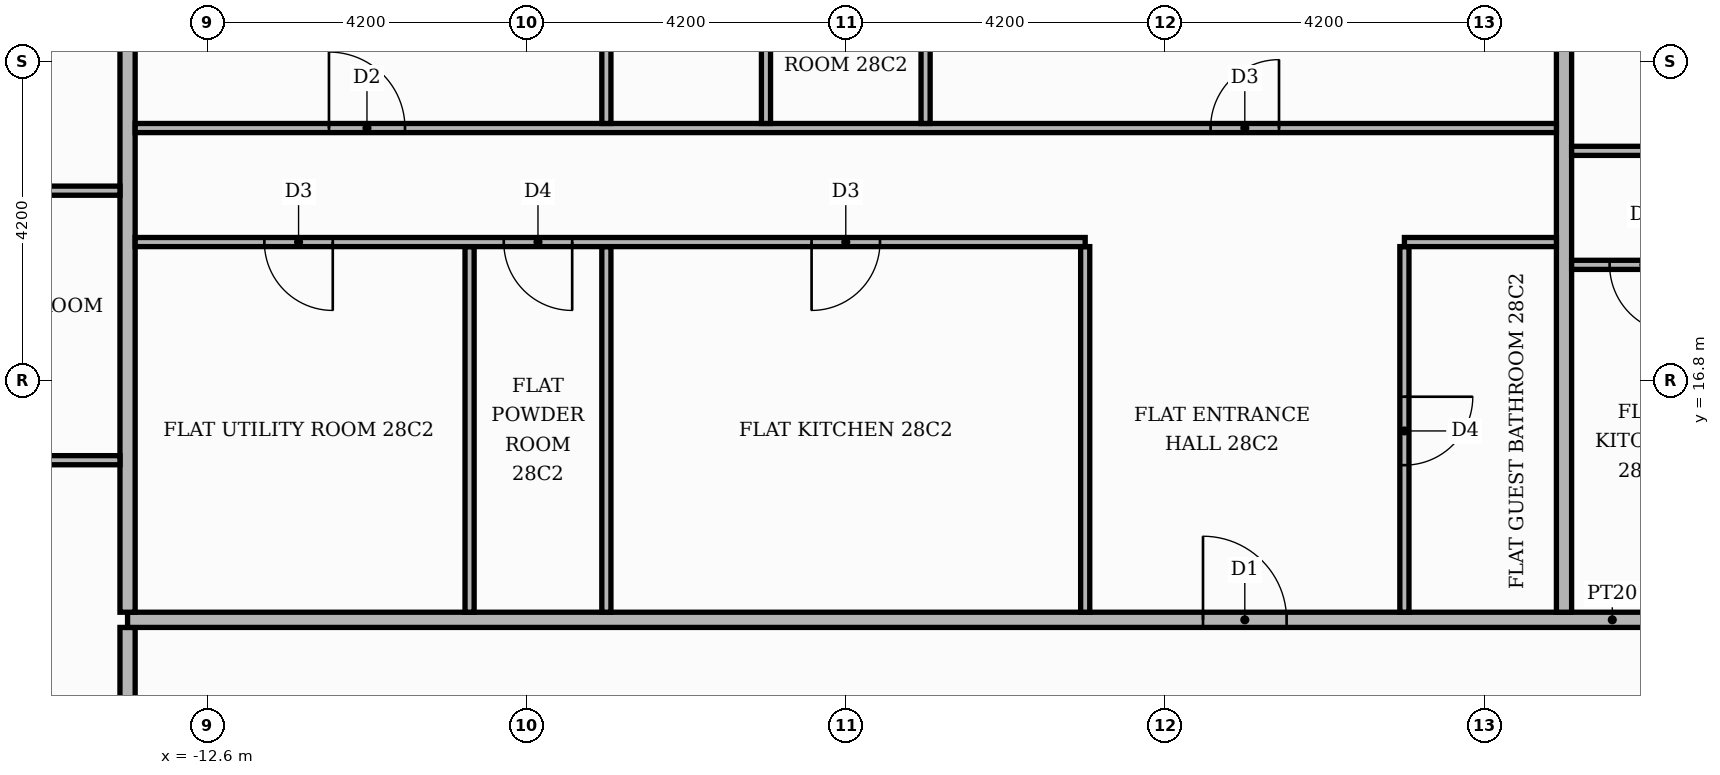
"""IFC4 building model, lengths in metres.
Left out: names, types, materials, properties, quantities, classifications, styles, units other than length and angle.
Written with IfcOpenShell. Run it as: python <this file> out.ifc"""

import sys

from ifc_helpers import new_model, si_unit, direction, frame, frame_2d, origin, place, context, subcontext, project, spatial, rectangle, extrude, element, fill, save


model = new_model("IFC4")
c1 = context("Model", 3, precision=1e-05, world=origin(), true_north=direction((0.0, 1.0)))
c2 = subcontext(c1, "Body", "Model", "MODEL_VIEW")
j1 = project(units=[si_unit("LENGTHUNIT", "METRE"), si_unit("PLANEANGLEUNIT", "RADIAN")], contexts=[c1])
p1 = place(None, origin())
s1 = spatial("IfcSite", under=j1, at=p1, CompositionType="ELEMENT")
p2 = place(p1, origin())
s2 = spatial("IfcBuilding", under=s1, at=p2, CompositionType="ELEMENT")
p3 = place(p2, frame((0.0, 0.0, 118.2)))
s3 = spatial("IfcBuildingStorey", under=s2, at=p3, CompositionType="ELEMENT", Elevation=118.2)
p4 = place(p3, frame((-13.65, 5.35, 0.0), z_axis=(0.0, 0.0, 1.0), x_axis=(0.0, 1.0, 0.0)))
e1 = element("IfcWall", 1, at=p4, inside=s3, PredefinedType="PARTITIONING", context=c2, shape_type="SweptSolid", body=[
    extrude(rectangle(XDim=8.2, YDim=0.2, at=frame_2d((4.1, 0.0))), origin(), (0.0, 0.0, 1.0), 3.48),
])
p5 = place(p4, frame((5.65, 0.0, 0.0)))
e2 = element("IfcOpeningElement", 2, at=p5, cuts=e1, PredefinedType="OPENING", context=c2, shape_type="SweptSolid", body=[
    extrude(rectangle(XDim=1.1, YDim=2.4, at=frame_2d((0.55, 1.2))), frame((0.0, 0.11, 0.0), z_axis=(0.0, -1.0, 0.0), x_axis=(1.0, 0.0, 0.0)), (0.0, 0.0, 1.0), 0.22),
])
p6 = place(p3, frame((-13.65, 13.65, 0.0), z_axis=(0.0, 0.0, 1.0), x_axis=(1.0, 0.0, 0.0)))
e3 = element("IfcWall", 3, at=p6, inside=s3, PredefinedType="PARTITIONING", context=c2, shape_type="SweptSolid", body=[
    extrude(rectangle(XDim=39.07, YDim=0.2, at=frame_2d((19.535, 0.0))), origin(), (0.0, 0.0, 1.0), 3.48),
])
p7 = place(p6, frame((24.65, 0.0, 0.0)))
e4 = element("IfcOpeningElement", 4, at=p7, cuts=e3, PredefinedType="OPENING", context=c2, shape_type="SweptSolid", body=[
    extrude(rectangle(XDim=1.1, YDim=2.4, at=frame_2d((0.55, 1.2))), frame((0.0, 0.11, 0.0), z_axis=(0.0, -1.0, 0.0), x_axis=(1.0, 0.0, 0.0)), (0.0, 0.0, 1.0), 0.22),
])
p8 = place(p6, frame((14.15, 0.0, 0.0)))
e5 = element("IfcOpeningElement", 5, at=p8, cuts=e3, PredefinedType="OPENING", context=c2, shape_type="SweptSolid", body=[
    extrude(rectangle(XDim=1.1, YDim=2.4, at=frame_2d((0.55, 1.2))), frame((0.0, 0.11, 0.0), z_axis=(0.0, -1.0, 0.0), x_axis=(1.0, 0.0, 0.0)), (0.0, 0.0, 1.0), 0.22),
])
p9 = place(p3, frame((-13.65, 13.75, 0.0), z_axis=(0.0, 0.0, 1.0), x_axis=(0.0, 1.0, 0.0)))
e6 = element("IfcWall", 6, at=p9, inside=s3, PredefinedType="PARTITIONING", context=c2, shape_type="SweptSolid", body=[
    extrude(rectangle(XDim=11.67, YDim=0.2, at=frame_2d((5.835, 0.0))), origin(), (0.0, 0.0, 1.0), 3.48),
])
for number, where, z_axis, x_axis in (
    (7, (-9.15, 13.75, 0.0), (0.0, 0.0, 1.0), (0.0, 1.0, 0.0)),
    (8, (-7.35, 13.75, 0.0), (0.0, 0.0, 1.0), (0.0, 1.0, 0.0)),
    (9, (-1.05, 13.75, 0.0), (0.0, 0.0, 1.0), (0.0, 1.0, 0.0)),
):
    element("IfcWall", number, at=place(p3, frame(where, z_axis=z_axis, x_axis=x_axis)), inside=s3, PredefinedType="PARTITIONING", context=c2, shape_type="SweptSolid", body=[
        extrude(rectangle(XDim=4.81, YDim=0.12, at=frame_2d((2.405, 0.0))), origin(), (0.0, 0.0, 1.0), 3.48),
    ])
p10 = place(p3, frame((3.15, 13.75, 0.0), z_axis=(0.0, 0.0, 1.0), x_axis=(0.0, 1.0, 0.0)))
e10 = element("IfcWall", 10, at=p10, inside=s3, PredefinedType="PARTITIONING", context=c2, shape_type="SweptSolid", body=[
    extrude(rectangle(XDim=4.81, YDim=0.12, at=frame_2d((2.405, 0.0))), origin(), (0.0, 0.0, 1.0), 3.48),
])
p11 = place(p10, frame((1.935, 0.0, 0.0)))
e11 = element("IfcOpeningElement", 11, at=p11, cuts=e10, PredefinedType="OPENING", context=c2, shape_type="SweptSolid", body=[
    extrude(rectangle(XDim=0.9, YDim=2.1, at=frame_2d((0.45, 1.05))), frame((0.0, 0.07, 0.0), z_axis=(0.0, -1.0, 0.0), x_axis=(1.0, 0.0, 0.0)), (0.0, 0.0, 1.0), 0.14),
])
p12 = place(p3, frame((5.25, 13.75, 0.0), z_axis=(0.0, 0.0, 1.0), x_axis=(0.0, 1.0, 0.0)))
e12 = element("IfcWall", 12, at=p12, inside=s3, PredefinedType="PARTITIONING", context=c2, shape_type="SweptSolid", body=[
    extrude(rectangle(XDim=11.67, YDim=0.2, at=frame_2d((5.835, 0.0))), origin(), (0.0, 0.0, 1.0), 3.48),
])
p13 = place(p3, frame((-19.82, 15.75, 0.0), z_axis=(0.0, 0.0, 1.0), x_axis=(1.0, 0.0, 0.0)))
e13 = element("IfcWall", 13, at=p13, inside=s3, PredefinedType="PARTITIONING", context=c2, shape_type="SweptSolid", body=[
    extrude(rectangle(XDim=6.07, YDim=0.12, at=frame_2d((3.035, 0.0))), origin(), (0.0, 0.0, 1.0), 3.48),
])
p14 = place(p13, frame((2.585, 0.0, 0.0)))
e14 = element("IfcOpeningElement", 14, at=p14, cuts=e13, PredefinedType="OPENING", context=c2, shape_type="SweptSolid", body=[
    extrude(rectangle(XDim=1.0, YDim=2.1, at=frame_2d((0.5, 1.05))), frame((0.0, 0.07, 0.0), z_axis=(0.0, -1.0, 0.0), x_axis=(1.0, 0.0, 0.0)), (0.0, 0.0, 1.0), 0.14),
])
p15 = place(p3, frame((5.35, 18.32, 0.0), z_axis=(0.0, 0.0, 1.0), x_axis=(1.0, 0.0, 0.0)))
e15 = element("IfcWall", 15, at=p15, inside=s3, PredefinedType="PARTITIONING", context=c2, shape_type="SweptSolid", body=[
    extrude(rectangle(XDim=4.1, YDim=0.12, at=frame_2d((2.05, 0.0))), origin(), (0.0, 0.0, 1.0), 3.48),
])
p16 = place(p15, frame((0.5, 0.0, 0.0)))
e16 = element("IfcOpeningElement", 16, at=p16, cuts=e15, PredefinedType="OPENING", context=c2, shape_type="SweptSolid", body=[
    extrude(rectangle(XDim=0.9, YDim=2.1, at=frame_2d((0.45, 1.05))), frame((0.0, 0.07, 0.0), z_axis=(0.0, -1.0, 0.0), x_axis=(1.0, 0.0, 0.0)), (0.0, 0.0, 1.0), 0.14),
])
p17 = place(p3, frame((-13.55, 18.62, 0.0), z_axis=(0.0, 0.0, 1.0), x_axis=(1.0, 0.0, 0.0)))
e17 = element("IfcWall", 17, at=p17, inside=s3, PredefinedType="PARTITIONING", context=c2, shape_type="SweptSolid", body=[
    extrude(rectangle(XDim=12.5, YDim=0.12, at=frame_2d((6.25, 0.0))), origin(), (0.0, 0.0, 1.0), 3.48),
])
p18 = place(p17, frame((8.9, 0.0, 0.0)))
e18 = element("IfcOpeningElement", 18, at=p18, cuts=e17, PredefinedType="OPENING", context=c2, shape_type="SweptSolid", body=[
    extrude(rectangle(XDim=0.9, YDim=2.1, at=frame_2d((0.45, 1.05))), frame((0.0, 0.07, 0.0), z_axis=(0.0, -1.0, 0.0), x_axis=(1.0, 0.0, 0.0)), (0.0, 0.0, 1.0), 0.14),
])
p19 = place(p17, frame((4.85, 0.0, 0.0)))
e19 = element("IfcOpeningElement", 19, at=p19, cuts=e17, PredefinedType="OPENING", context=c2, shape_type="SweptSolid", body=[
    extrude(rectangle(XDim=0.9, YDim=2.1, at=frame_2d((0.45, 1.05))), frame((0.0, 0.07, 0.0), z_axis=(0.0, -1.0, 0.0), x_axis=(1.0, 0.0, 0.0)), (0.0, 0.0, 1.0), 0.14),
])
p20 = place(p17, frame((1.7, 0.0, 0.0)))
e20 = element("IfcOpeningElement", 20, at=p20, cuts=e17, PredefinedType="OPENING", context=c2, shape_type="SweptSolid", body=[
    extrude(rectangle(XDim=0.9, YDim=2.1, at=frame_2d((0.45, 1.05))), frame((0.0, 0.07, 0.0), z_axis=(0.0, -1.0, 0.0), x_axis=(1.0, 0.0, 0.0)), (0.0, 0.0, 1.0), 0.14),
])
p21 = place(p3, frame((3.15, 18.62, 0.0), z_axis=(0.0, 0.0, 1.0), x_axis=(1.0, 0.0, 0.0)))
e21 = element("IfcWall", 21, at=p21, inside=s3, PredefinedType="PARTITIONING", context=c2, shape_type="SweptSolid", body=[
    extrude(rectangle(XDim=2.0, YDim=0.12, at=frame_2d((1.0, 0.0))), origin(), (0.0, 0.0, 1.0), 3.48),
])
p22 = place(p3, frame((-17.4, 19.296, 0.0), z_axis=(0.0, 0.0, 1.0), x_axis=(1.0, 0.0, 0.0)))
e22 = element("IfcWall", 22, at=p22, inside=s3, PredefinedType="PARTITIONING", context=c2, shape_type="SweptSolid", body=[
    extrude(rectangle(XDim=3.65, YDim=0.12, at=frame_2d((1.825, 0.0))), origin(), (0.0, 0.0, 1.0), 3.48),
])
p23 = place(p3, frame((5.35, 19.82, 0.0), z_axis=(0.0, 0.0, 1.0), x_axis=(1.0, 0.0, 0.0)))
e23 = element("IfcWall", 23, at=p23, inside=s3, PredefinedType="PARTITIONING", context=c2, shape_type="SweptSolid", body=[
    extrude(rectangle(XDim=12.05, YDim=0.12, at=frame_2d((6.025, 0.0))), origin(), (0.0, 0.0, 1.0), 3.48),
])
p24 = place(p23, frame((8.85, 0.0, 0.0)))
e24 = element("IfcOpeningElement", 24, at=p24, cuts=e23, PredefinedType="OPENING", context=c2, shape_type="SweptSolid", body=[
    extrude(rectangle(XDim=1.0, YDim=2.1, at=frame_2d((0.5, 1.05))), frame((0.0, 0.07, 0.0), z_axis=(0.0, -1.0, 0.0), x_axis=(1.0, 0.0, 0.0)), (0.0, 0.0, 1.0), 0.14),
])
p25 = place(p23, frame((5.75, 0.0, 0.0)))
e25 = element("IfcOpeningElement", 25, at=p25, cuts=e23, PredefinedType="OPENING", context=c2, shape_type="SweptSolid", body=[
    extrude(rectangle(XDim=0.9, YDim=2.1, at=frame_2d((0.45, 1.05))), frame((0.0, 0.07, 0.0), z_axis=(0.0, -1.0, 0.0), x_axis=(1.0, 0.0, 0.0)), (0.0, 0.0, 1.0), 0.14),
])
p26 = place(p3, frame((-13.55, 20.12, 0.0), z_axis=(0.0, 0.0, 1.0), x_axis=(1.0, 0.0, 0.0)))
e26 = element("IfcWall", 26, at=p26, inside=s3, PredefinedType="PARTITIONING", context=c2, shape_type="SweptSolid", body=[
    extrude(rectangle(XDim=18.7, YDim=0.12, at=frame_2d((9.35, 0.0))), origin(), (0.0, 0.0, 1.0), 3.48),
])
p27 = place(p26, frame((14.15, 0.0, 0.0)))
e27 = element("IfcOpeningElement", 27, at=p27, cuts=e26, PredefinedType="OPENING", context=c2, shape_type="SweptSolid", body=[
    extrude(rectangle(XDim=0.9, YDim=2.1, at=frame_2d((0.45, 1.05))), frame((0.0, 0.07, 0.0), z_axis=(0.0, -1.0, 0.0), x_axis=(1.0, 0.0, 0.0)), (0.0, 0.0, 1.0), 0.14),
])
p28 = place(p26, frame((2.55, 0.0, 0.0)))
e28 = element("IfcOpeningElement", 28, at=p28, cuts=e26, PredefinedType="OPENING", context=c2, shape_type="SweptSolid", body=[
    extrude(rectangle(XDim=1.0, YDim=2.1, at=frame_2d((0.5, 1.05))), frame((0.0, 0.07, 0.0), z_axis=(0.0, -1.0, 0.0), x_axis=(1.0, 0.0, 0.0)), (0.0, 0.0, 1.0), 0.14),
])
p29 = place(p3, frame((-7.35, 20.18, 0.0), z_axis=(0.0, 0.0, 1.0), x_axis=(0.0, 1.0, 0.0)))
e29 = element("IfcWall", 29, at=p29, inside=s3, PredefinedType="PARTITIONING", context=c2, shape_type="SweptSolid", body=[
    extrude(rectangle(XDim=5.24, YDim=0.12, at=frame_2d((2.62, 0.0))), origin(), (0.0, 0.0, 1.0), 3.48),
])
p30 = place(p3, frame((-5.25, 20.18, 0.0), z_axis=(0.0, 0.0, 1.0), x_axis=(0.0, 1.0, 0.0)))
e30 = element("IfcWall", 30, at=p30, inside=s3, PredefinedType="PARTITIONING", context=c2, shape_type="SweptSolid", body=[
    extrude(rectangle(XDim=5.24, YDim=0.12, at=frame_2d((2.62, 0.0))), origin(), (0.0, 0.0, 1.0), 3.48),
])
p31 = place(p30, frame((2.29, 0.0, 0.0)))
e31 = element("IfcOpeningElement", 31, at=p31, cuts=e30, PredefinedType="OPENING", context=c2, shape_type="SweptSolid", body=[
    extrude(rectangle(XDim=0.9, YDim=2.1, at=frame_2d((0.45, 1.05))), frame((0.0, 0.07, 0.0), z_axis=(0.0, -1.0, 0.0), x_axis=(1.0, 0.0, 0.0)), (0.0, 0.0, 1.0), 0.14),
])
p32 = place(p3, frame((-3.15, 20.18, 0.0), z_axis=(0.0, 0.0, 1.0), x_axis=(0.0, 1.0, 0.0)))
e32 = element("IfcWall", 32, at=p32, inside=s3, PredefinedType="PARTITIONING", context=c2, shape_type="SweptSolid", body=[
    extrude(rectangle(XDim=5.24, YDim=0.12, at=frame_2d((2.62, 0.0))), origin(), (0.0, 0.0, 1.0), 3.48),
])
p33 = place(p32, frame((2.29, 0.0, 0.0)))
e33 = element("IfcOpeningElement", 33, at=p33, cuts=e32, PredefinedType="OPENING", context=c2, shape_type="SweptSolid", body=[
    extrude(rectangle(XDim=0.9, YDim=2.1, at=frame_2d((0.45, 1.05))), frame((0.0, 0.07, 0.0), z_axis=(0.0, -1.0, 0.0), x_axis=(1.0, 0.0, 0.0)), (0.0, 0.0, 1.0), 0.14),
])
p34 = place(p16, frame((0.9, 0.0, 0.0), z_axis=(0.0, 0.0, 1.0), x_axis=(-1.0, 0.0, 0.0)))
e34 = element("IfcDoor", 34, at=p34, inside=s3, OperationType="SINGLE_SWING_RIGHT", PredefinedType="DOOR", context=c2, shape_type="SweptSolid", body=[
    extrude(rectangle(XDim=0.9, YDim=2.1, at=frame_2d((0.45, 1.05))), frame((0.0, 0.025, 0.0), z_axis=(0.0, -1.0, 0.0), x_axis=(1.0, 0.0, 0.0)), (0.0, 0.0, 1.0), 0.05),
])
fill(e16, e34)
p35 = place(p8, origin())
e35 = element("IfcDoor", 35, at=p35, inside=s3, OperationType="SINGLE_SWING_LEFT", PredefinedType="DOOR", context=c2, shape_type="SweptSolid", body=[
    extrude(rectangle(XDim=1.1, YDim=2.4, at=frame_2d((0.55, 1.2))), frame((0.0, 0.025, 0.0), z_axis=(0.0, -1.0, 0.0), x_axis=(1.0, 0.0, 0.0)), (0.0, 0.0, 1.0), 0.05),
])
fill(e5, e35)
p36 = place(p11, frame((0.9, 0.0, 0.0), z_axis=(0.0, 0.0, 1.0), x_axis=(-1.0, 0.0, 0.0)))
e36 = element("IfcDoor", 36, at=p36, inside=s3, OperationType="SINGLE_SWING_RIGHT", PredefinedType="DOOR", context=c2, shape_type="SweptSolid", body=[
    extrude(rectangle(XDim=0.9, YDim=2.1, at=frame_2d((0.45, 1.05))), frame((0.0, 0.025, 0.0), z_axis=(0.0, -1.0, 0.0), x_axis=(1.0, 0.0, 0.0)), (0.0, 0.0, 1.0), 0.05),
])
fill(e11, e36)
p37 = place(p18, frame((0.9, 0.0, 0.0), z_axis=(0.0, 0.0, 1.0), x_axis=(-1.0, 0.0, 0.0)))
e37 = element("IfcDoor", 37, at=p37, inside=s3, OperationType="SINGLE_SWING_LEFT", PredefinedType="DOOR", context=c2, shape_type="SweptSolid", body=[
    extrude(rectangle(XDim=0.9, YDim=2.1, at=frame_2d((0.45, 1.05))), frame((0.0, 0.025, 0.0), z_axis=(0.0, -1.0, 0.0), x_axis=(1.0, 0.0, 0.0)), (0.0, 0.0, 1.0), 0.05),
])
fill(e18, e37)
p38 = place(p19, frame((0.9, 0.0, 0.0), z_axis=(0.0, 0.0, 1.0), x_axis=(-1.0, 0.0, 0.0)))
e38 = element("IfcDoor", 38, at=p38, inside=s3, OperationType="SINGLE_SWING_RIGHT", PredefinedType="DOOR", context=c2, shape_type="SweptSolid", body=[
    extrude(rectangle(XDim=0.9, YDim=2.1, at=frame_2d((0.45, 1.05))), frame((0.0, 0.025, 0.0), z_axis=(0.0, -1.0, 0.0), x_axis=(1.0, 0.0, 0.0)), (0.0, 0.0, 1.0), 0.05),
])
fill(e19, e38)
p39 = place(p20, frame((0.9, 0.0, 0.0), z_axis=(0.0, 0.0, 1.0), x_axis=(-1.0, 0.0, 0.0)))
e39 = element("IfcDoor", 39, at=p39, inside=s3, OperationType="SINGLE_SWING_RIGHT", PredefinedType="DOOR", context=c2, shape_type="SweptSolid", body=[
    extrude(rectangle(XDim=0.9, YDim=2.1, at=frame_2d((0.45, 1.05))), frame((0.0, 0.025, 0.0), z_axis=(0.0, -1.0, 0.0), x_axis=(1.0, 0.0, 0.0)), (0.0, 0.0, 1.0), 0.05),
])
fill(e20, e39)
p40 = place(p27, origin())
e40 = element("IfcDoor", 40, at=p40, inside=s3, OperationType="SINGLE_SWING_RIGHT", PredefinedType="DOOR", context=c2, shape_type="SweptSolid", body=[
    extrude(rectangle(XDim=0.9, YDim=2.1, at=frame_2d((0.45, 1.05))), frame((0.0, 0.025, 0.0), z_axis=(0.0, -1.0, 0.0), x_axis=(1.0, 0.0, 0.0)), (0.0, 0.0, 1.0), 0.05),
])
fill(e27, e40)
p41 = place(p28, origin())
e41 = element("IfcDoor", 41, at=p41, inside=s3, OperationType="SINGLE_SWING_LEFT", PredefinedType="DOOR", context=c2, shape_type="SweptSolid", body=[
    extrude(rectangle(XDim=1.0, YDim=2.1, at=frame_2d((0.5, 1.05))), frame((0.0, 0.025, 0.0), z_axis=(0.0, -1.0, 0.0), x_axis=(1.0, 0.0, 0.0)), (0.0, 0.0, 1.0), 0.05),
])
fill(e28, e41)
save(model, sys.argv[1])
